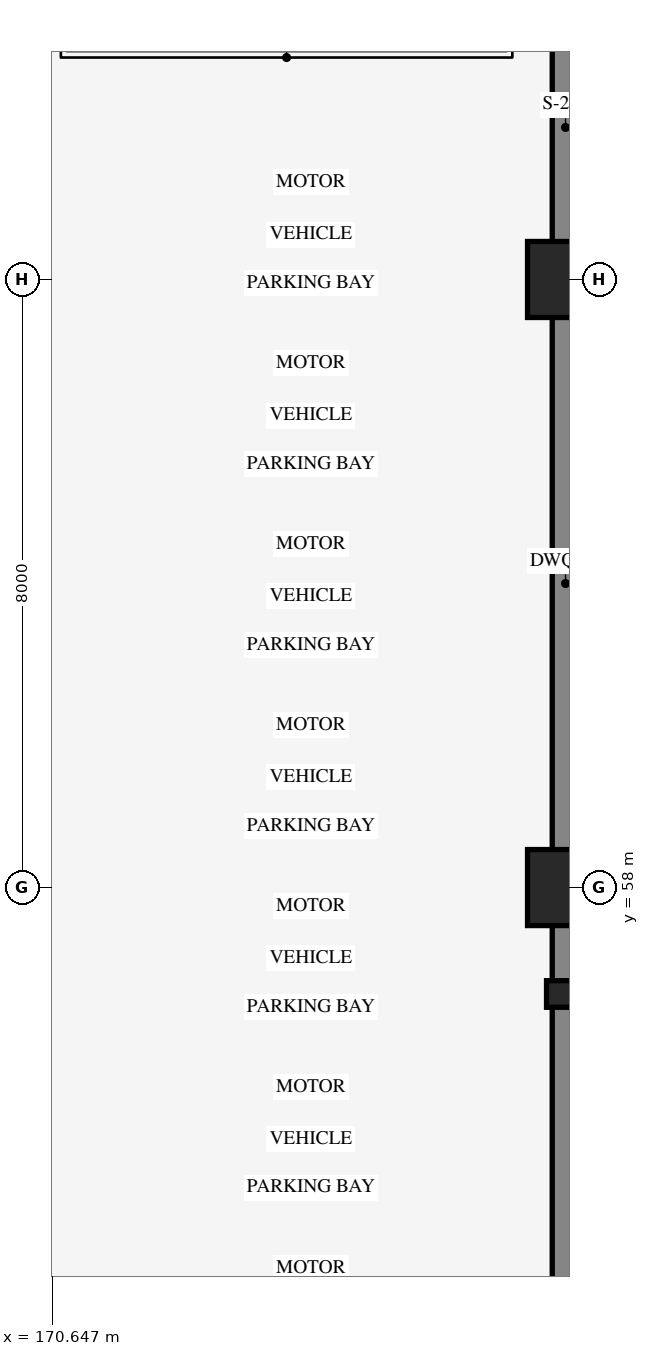
"""IFC4 building model, lengths in metres.
Left out: names, types, materials, properties, quantities, classifications, styles, units other than length and angle.
Written with IfcOpenShell. Run it as: python <this file> out.ifc"""

import sys

from ifc_helpers import new_model, si_unit, direction, frame, frame_2d, origin, origin_2d, place, context, subcontext, project, spatial, rectangle, extrude, element, save


model = new_model("IFC4")
c1 = context("Model", 3, precision=1e-05, world=origin(), true_north=direction((0.0, 1.0)))
c2 = subcontext(c1, "Body", "Model", "MODEL_VIEW")
j1 = project(units=[si_unit("LENGTHUNIT", "METRE"), si_unit("PLANEANGLEUNIT", "RADIAN")], contexts=[c1])
p1 = place(None, origin())
s1 = spatial("IfcSite", under=j1, at=p1, CompositionType="ELEMENT")
p2 = place(p1, origin())
s2 = spatial("IfcBuilding", under=s1, at=p2, CompositionType="ELEMENT")
p3 = place(p2, frame((0.0, 0.0, -4.5)))
s3 = spatial("IfcBuildingStorey", under=s2, at=p3, CompositionType="ELEMENT", Elevation=-4.5)
p4 = place(p3, frame((177.4, 26.0, 0.0), z_axis=(0.0, 0.0, 1.0), x_axis=(0.0, 1.0, 0.0)))
e1 = element("IfcWall", 1, at=p4, inside=s3, PredefinedType="SOLIDWALL", context=c2, shape_type="SweptSolid", body=[
    extrude(rectangle(XDim=80.0, YDim=0.35, at=frame_2d((40.0, 0.0))), origin(), (0.0, 0.0, 1.0), 4.22),
])
for number, where, z_axis, x_axis in (
    (2, (177.4, 58.0, 0.0), (0.0, 0.0, 1.0), (1.0, 0.0, 0.0)),
    (3, (177.4, 66.0, 0.0), (0.0, 0.0, 1.0), (1.0, 0.0, 0.0)),
):
    element("IfcColumn", number, at=place(p3, frame(where, z_axis=z_axis, x_axis=x_axis)), inside=s3, PredefinedType="COLUMN", context=c2, shape_type="SweptSolid", body=[
        extrude(rectangle(XDim=1.0, YDim=1.0, at=origin_2d()), origin(), (0.0, 0.0, 1.0), 4.5),
    ])
p5 = place(p3, frame((177.4, 56.6, 0.0), z_axis=(0.0, 0.0, 1.0), x_axis=(0.0, 1.0, 0.0)))
e4 = element("IfcColumn", 4, at=p5, inside=s3, PredefinedType="PILASTER", context=c2, shape_type="SweptSolid", body=[
    extrude(rectangle(XDim=0.35, YDim=0.5, at=origin_2d()), origin(), (0.0, 0.0, 1.0), 4.5),
])
save(model, sys.argv[1])
